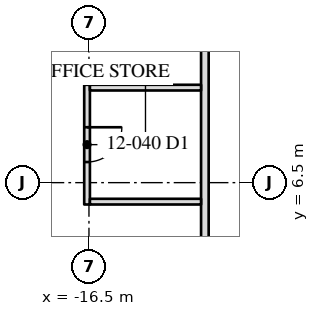
"""IFC4 building model, lengths in metres.
Left out: names, types, materials, properties, quantities, classifications, styles, units other than length and angle.
Written with IfcOpenShell. Run it as: python <this file> out.ifc"""

import sys

from ifc_helpers import new_model, si_unit, direction, frame, frame_2d, origin, place, context, subcontext, project, spatial, rectangle, extrude, element, fill, save


model = new_model("IFC4")
c1 = context("Model", 3, precision=1e-05, world=origin(), true_north=direction((0.0, 1.0)))
c2 = subcontext(c1, "Body", "Model", "MODEL_VIEW")
j1 = project(units=[si_unit("LENGTHUNIT", "METRE"), si_unit("PLANEANGLEUNIT", "RADIAN")], contexts=[c1])
p1 = place(None, origin())
s1 = spatial("IfcSite", under=j1, at=p1, CompositionType="ELEMENT")
p2 = place(p1, origin())
s2 = spatial("IfcBuilding", under=s1, at=p2, CompositionType="ELEMENT")
p3 = place(p2, frame((0.0, 0.0, 52.9)))
s3 = spatial("IfcBuildingStorey", under=s2, at=p3, CompositionType="ELEMENT", Elevation=52.9)
p4 = place(p3, frame((-13.45, 13.55, 0.0), z_axis=(0.0, 0.0, 1.0), x_axis=(0.0, -1.0, 0.0)))
e1 = element("IfcWall", 1, at=p4, inside=s3, PredefinedType="PARTITIONING", context=c2, shape_type="SweptSolid", body=[
    extrude(rectangle(XDim=26.9, YDim=0.2, at=frame_2d((13.45, 0.0))), origin(), (0.0, 0.0, 1.0), 3.91),
])
p5 = place(p3, frame((-16.55, 9.075, 0.0), z_axis=(0.0, 0.0, 1.0), x_axis=(0.0, -1.0, 0.0)))
e2 = element("IfcWall", 2, at=p5, inside=s3, PredefinedType="PARTITIONING", context=c2, shape_type="SweptSolid", body=[
    extrude(rectangle(XDim=3.15, YDim=0.15, at=frame_2d((1.575, 0.0))), origin(), (0.0, 0.0, 1.0), 3.91),
])
p6 = place(p5, frame((1.117, 0.0, 0.0)))
e3 = element("IfcOpeningElement", 3, at=p6, cuts=e2, PredefinedType="OPENING", context=c2, shape_type="SweptSolid", body=[
    extrude(rectangle(XDim=0.915, YDim=2.134, at=frame_2d((0.458, 1.067))), frame((0.0, 0.085, 0.0), z_axis=(0.0, -1.0, 0.0), x_axis=(1.0, 0.0, 0.0)), (0.0, 0.0, 1.0), 0.17),
])
for number, where, z_axis, x_axis in (
    (4, (-16.475, 9.0, 0.0), (0.0, 0.0, 1.0), (1.0, 0.0, 0.0)),
    (5, (-16.475, 6.0, 0.0), (0.0, 0.0, 1.0), (1.0, 0.0, 0.0)),
):
    element("IfcWall", number, at=place(p3, frame(where, z_axis=z_axis, x_axis=x_axis)), inside=s3, PredefinedType="PARTITIONING", context=c2, shape_type="SweptSolid", body=[
        extrude(rectangle(XDim=2.925, YDim=0.15, at=frame_2d((1.462, 0.0))), origin(), (0.0, 0.0, 1.0), 3.91),
    ])
p7 = place(p6, origin())
e6 = element("IfcDoor", 6, at=p7, inside=s3, OperationType="SINGLE_SWING_LEFT", PredefinedType="DOOR", context=c2, shape_type="SweptSolid", body=[
    extrude(rectangle(XDim=0.915, YDim=2.134, at=frame_2d((0.458, 1.067))), frame((0.0, 0.025, 0.0), z_axis=(0.0, -1.0, 0.0), x_axis=(1.0, 0.0, 0.0)), (0.0, 0.0, 1.0), 0.05),
])
fill(e3, e6)
save(model, sys.argv[1])
